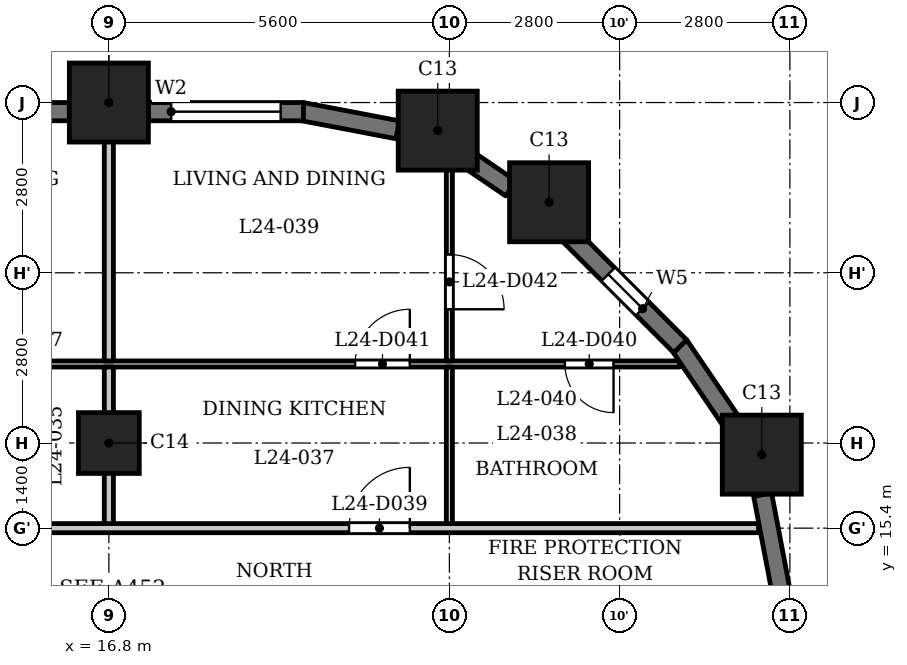
"""IFC4 building model, lengths in metres.
Left out: names, types, materials, properties, quantities, classifications, styles, units other than length and angle.
Written with IfcOpenShell. Run it as: python <this file> out.ifc"""

import sys

from ifc_helpers import new_model, si_unit, direction, frame, frame_2d, origin, origin_2d, place, context, subcontext, project, spatial, rectangle, extrude, element, fill, save


model = new_model("IFC4")
c1 = context("Model", 3, precision=1e-05, world=origin(), true_north=direction((0.0, 1.0)))
c2 = subcontext(c1, "Body", "Model", "MODEL_VIEW")
j1 = project(units=[si_unit("LENGTHUNIT", "METRE"), si_unit("PLANEANGLEUNIT", "RADIAN")], contexts=[c1])
p1 = place(None, origin())
s1 = spatial("IfcSite", under=j1, at=p1, CompositionType="ELEMENT")
p2 = place(p1, origin())
s2 = spatial("IfcBuilding", under=s1, at=p2, CompositionType="ELEMENT")
p3 = place(p2, frame((0.0, 0.0, 97.3)))
s3 = spatial("IfcBuildingStorey", under=s2, at=p3, CompositionType="ELEMENT", Elevation=97.3)
for number, where, z_axis, x_axis in (
    (1, (27.538, 16.609, 0.0), (0.0, 0.0, 1.0), (1.0, 0.0, 0.0)),
    (2, (24.04, 20.76, 0.0), (0.0, 0.0, 1.0), (1.0, 0.0, 0.0)),
    (3, (22.209, 21.938, 0.0), (0.0, 0.0, 1.0), (1.0, 0.0, 0.0)),
    (4, (16.8, 22.4, 0.0), (0.0, 0.0, 1.0), (1.0, 0.0, 0.0)),
):
    element("IfcColumn", number, at=place(p3, frame(where, z_axis=z_axis, x_axis=x_axis)), inside=s3, PredefinedType="COLUMN", context=c2, shape_type="SweptSolid", body=[
        extrude(rectangle(XDim=1.3, YDim=1.3, at=origin_2d()), origin(), (0.0, 0.0, 1.0), 3.5),
    ])
p4 = place(p3, frame((16.8, 16.8, 0.0), z_axis=(0.0, 0.0, 1.0), x_axis=(1.0, 0.0, 0.0)))
e5 = element("IfcColumn", 5, at=p4, inside=s3, PredefinedType="COLUMN", context=c2, shape_type="SweptSolid", body=[
    extrude(rectangle(XDim=1.0, YDim=1.0, at=origin_2d()), origin(), (0.0, 0.0, 1.0), 3.5),
])
for number, where, z_axis, x_axis in (
    (6, (27.853, 14.372, 0.0), (0.0, 0.0, 1.0), (-0.187, 0.982, 0.0)),
    (7, (27.082, 17.084, 0.0), (0.0, 0.0, 1.0), (-0.562, 0.827, 0.0)),
):
    element("IfcWall", number, at=place(p3, frame(where, z_axis=z_axis, x_axis=x_axis)), inside=s3, PredefinedType="SOLIDWALL", context=c2, shape_type="SweptSolid", body=[
        extrude(rectangle(XDim=1.606, YDim=0.3, at=frame_2d((0.803, 0.0))), origin(), (0.0, 0.0, 1.0), 2.4),
    ])
p5 = place(p3, frame((26.197, 18.391, 0.0), z_axis=(0.0, 0.0, 1.0), x_axis=(-0.707058908279, 0.707154650853, 0.0)))
e8 = element("IfcWall", 8, at=p5, inside=s3, PredefinedType="SOLIDWALL", context=c2, shape_type="SweptSolid", body=[
    extrude(rectangle(XDim=2.55, YDim=0.3, at=frame_2d((1.275, 0.0))), origin(), (0.0, 0.0, 1.0), 2.4),
])
p6 = place(p5, frame((0.875, 0.0, 0.6)))
e9 = element("IfcOpeningElement", 9, at=p6, cuts=e8, PredefinedType="OPENING", context=c2, shape_type="SweptSolid", body=[
    extrude(rectangle(XDim=0.8, YDim=1.55, at=frame_2d((0.4, 0.775))), frame((0.0, 0.16, 0.0), z_axis=(0.0, -1.0, 0.0), x_axis=(1.0, 0.0, 0.0)), (0.0, 0.0, 1.0), 0.32),
])
p7 = place(p3, frame((23.41, 20.989, 0.0), z_axis=(0.0, 0.0, 1.0), x_axis=(-0.827050703543, 0.562127328787, 0.0)))
e10 = element("IfcWall", 10, at=p7, inside=s3, PredefinedType="SOLIDWALL", context=c2, shape_type="SweptSolid", body=[
    extrude(rectangle(XDim=0.877, YDim=0.3, at=frame_2d((0.438, 0.0))), origin(), (0.0, 0.0, 1.0), 3.2),
])
p8 = place(p3, frame((21.55, 21.952, 0.0), z_axis=(0.0, 0.0, 1.0), x_axis=(-0.982278644094, 0.187426426519, 0.0)))
e11 = element("IfcWall", 11, at=p8, inside=s3, PredefinedType="SOLIDWALL", context=c2, shape_type="SweptSolid", body=[
    extrude(rectangle(XDim=1.606, YDim=0.3, at=frame_2d((0.803, 0.0))), origin(), (0.0, 0.0, 1.0), 2.4),
])
p9 = place(p3, frame((20.0, 22.25, 0.0), z_axis=(0.0, 0.0, 1.0), x_axis=(-1.0, 0.0, 0.0)))
e12 = element("IfcWall", 12, at=p9, inside=s3, PredefinedType="SOLIDWALL", context=c2, shape_type="SweptSolid", body=[
    extrude(rectangle(XDim=2.55, YDim=0.3, at=frame_2d((1.275, 0.0))), origin(), (0.0, 0.0, 1.0), 2.4),
])
p10 = place(p9, frame((0.375, 0.0, 0.9)))
e13 = element("IfcOpeningElement", 13, at=p10, cuts=e12, PredefinedType="OPENING", context=c2, shape_type="SweptSolid", body=[
    extrude(rectangle(XDim=1.8, YDim=1.25, at=frame_2d((0.9, 0.625))), frame((0.0, 0.16, 0.0), z_axis=(0.0, -1.0, 0.0), x_axis=(1.0, 0.0, 0.0)), (0.0, 0.0, 1.0), 0.32),
])
p11 = place(p3, frame((16.15, 22.25, 0.0), z_axis=(0.0, 0.0, 1.0), x_axis=(-1.0, 0.0, 0.0)))
e14 = element("IfcWall", 14, at=p11, inside=s3, PredefinedType="SOLIDWALL", context=c2, shape_type="SweptSolid", body=[
    extrude(rectangle(XDim=4.3, YDim=0.3, at=frame_2d((2.15, 0.0))), origin(), (0.0, 0.0, 1.0), 2.4),
])
p12 = place(p11, frame((0.35, 0.0, 1.2)))
e15 = element("IfcOpeningElement", 15, at=p12, cuts=e14, PredefinedType="OPENING", context=c2, shape_type="SweptSolid", body=[
    extrude(rectangle(XDim=3.6, YDim=0.95, at=frame_2d((1.8, 0.475))), frame((0.0, 0.16, 0.0), z_axis=(0.0, -1.0, 0.0), x_axis=(1.0, 0.0, 0.0)), (0.0, 0.0, 1.0), 0.32),
])
p13 = place(p3, frame((-27.484, 15.4, 0.0), z_axis=(0.0, 0.0, 1.0), x_axis=(1.0, 0.0, 0.0)))
e16 = element("IfcWall", 16, at=p13, inside=s3, PredefinedType="PARTITIONING", context=c2, shape_type="SweptSolid", body=[
    extrude(rectangle(XDim=54.968, YDim=0.15, at=frame_2d((27.484, 0.0))), origin(), (0.0, 0.0, 1.0), 3.2),
])
p14 = place(p13, frame((9.034, 0.0, 0.0)))
e17 = element("IfcOpeningElement", 17, at=p14, cuts=e16, PredefinedType="OPENING", context=c2, shape_type="SweptSolid", body=[
    extrude(rectangle(XDim=1.0, YDim=2.1, at=frame_2d((0.5, 1.05))), frame((0.0, 0.085, 0.0), z_axis=(0.0, -1.0, 0.0), x_axis=(1.0, 0.0, 0.0)), (0.0, 0.0, 1.0), 0.17),
])
p15 = place(p13, frame((14.634, 0.0, 0.0)))
e18 = element("IfcOpeningElement", 18, at=p15, cuts=e16, PredefinedType="OPENING", context=c2, shape_type="SweptSolid", body=[
    extrude(rectangle(XDim=1.0, YDim=2.1, at=frame_2d((0.5, 1.05))), frame((0.0, 0.085, 0.0), z_axis=(0.0, -1.0, 0.0), x_axis=(1.0, 0.0, 0.0)), (0.0, 0.0, 1.0), 0.17),
])
p16 = place(p13, frame((19.984, 0.0, 0.0)))
e19 = element("IfcOpeningElement", 19, at=p16, cuts=e16, PredefinedType="OPENING", context=c2, shape_type="SweptSolid", body=[
    extrude(rectangle(XDim=1.0, YDim=2.1, at=frame_2d((0.5, 1.05))), frame((0.0, 0.085, 0.0), z_axis=(0.0, -1.0, 0.0), x_axis=(1.0, 0.0, 0.0)), (0.0, 0.0, 1.0), 0.17),
])
p17 = place(p13, frame((23.234, 0.0, 0.0)))
e20 = element("IfcOpeningElement", 20, at=p17, cuts=e16, PredefinedType="OPENING", context=c2, shape_type="SweptSolid", body=[
    extrude(rectangle(XDim=1.0, YDim=2.1, at=frame_2d((0.5, 1.05))), frame((0.0, 0.085, 0.0), z_axis=(0.0, -1.0, 0.0), x_axis=(1.0, 0.0, 0.0)), (0.0, 0.0, 1.0), 0.17),
])
p18 = place(p13, frame((28.184, 0.0, 0.0)))
e21 = element("IfcOpeningElement", 21, at=p18, cuts=e16, PredefinedType="OPENING", context=c2, shape_type="SweptSolid", body=[
    extrude(rectangle(XDim=1.0, YDim=2.1, at=frame_2d((0.5, 1.05))), frame((0.0, 0.085, 0.0), z_axis=(0.0, -1.0, 0.0), x_axis=(1.0, 0.0, 0.0)), (0.0, 0.0, 1.0), 0.17),
])
p19 = place(p13, frame((39.284, 0.0, 0.0)))
e22 = element("IfcOpeningElement", 22, at=p19, cuts=e16, PredefinedType="OPENING", context=c2, shape_type="SweptSolid", body=[
    extrude(rectangle(XDim=1.0, YDim=2.1, at=frame_2d((0.5, 1.05))), frame((0.0, 0.085, 0.0), z_axis=(0.0, -1.0, 0.0), x_axis=(1.0, 0.0, 0.0)), (0.0, 0.0, 1.0), 0.17),
])
p20 = place(p13, frame((48.234, 0.0, 0.0)))
e23 = element("IfcOpeningElement", 23, at=p20, cuts=e16, PredefinedType="OPENING", context=c2, shape_type="SweptSolid", body=[
    extrude(rectangle(XDim=1.0, YDim=2.1, at=frame_2d((0.5, 1.05))), frame((0.0, 0.085, 0.0), z_axis=(0.0, -1.0, 0.0), x_axis=(1.0, 0.0, 0.0)), (0.0, 0.0, 1.0), 0.17),
])
p21 = place(p3, frame((-26.44, 18.1, 0.0), z_axis=(0.0, 0.0, 1.0), x_axis=(1.0, 0.0, 0.0)))
e24 = element("IfcWall", 24, at=p21, inside=s3, PredefinedType="PARTITIONING", context=c2, shape_type="SweptSolid", body=[
    extrude(rectangle(XDim=52.63, YDim=0.1, at=frame_2d((26.315, 0.0))), origin(), (0.0, 0.0, 1.0), 3.2),
])
p22 = place(p21, frame((2.626, 0.0, 0.0)))
e25 = element("IfcOpeningElement", 25, at=p22, cuts=e24, PredefinedType="OPENING", context=c2, shape_type="SweptSolid", body=[
    extrude(rectangle(XDim=0.8, YDim=2.1, at=frame_2d((0.4, 1.05))), frame((0.0, 0.06, 0.0), z_axis=(0.0, -1.0, 0.0), x_axis=(1.0, 0.0, 0.0)), (0.0, 0.0, 1.0), 0.12),
])
p23 = place(p21, frame((8.09, 0.0, 0.0)))
e26 = element("IfcOpeningElement", 26, at=p23, cuts=e24, PredefinedType="OPENING", context=c2, shape_type="SweptSolid", body=[
    extrude(rectangle(XDim=0.9, YDim=2.1, at=frame_2d((0.45, 1.05))), frame((0.0, 0.06, 0.0), z_axis=(0.0, -1.0, 0.0), x_axis=(1.0, 0.0, 0.0)), (0.0, 0.0, 1.0), 0.12),
])
p24 = place(p21, frame((10.29, 0.0, 0.0)))
e27 = element("IfcOpeningElement", 27, at=p24, cuts=e24, PredefinedType="OPENING", context=c2, shape_type="SweptSolid", body=[
    extrude(rectangle(XDim=0.8, YDim=2.1, at=frame_2d((0.4, 1.05))), frame((0.0, 0.06, 0.0), z_axis=(0.0, -1.0, 0.0), x_axis=(1.0, 0.0, 0.0)), (0.0, 0.0, 1.0), 0.12),
])
p25 = place(p21, frame((13.69, 0.0, 0.0)))
e28 = element("IfcOpeningElement", 28, at=p25, cuts=e24, PredefinedType="OPENING", context=c2, shape_type="SweptSolid", body=[
    extrude(rectangle(XDim=0.9, YDim=2.1, at=frame_2d((0.45, 1.05))), frame((0.0, 0.06, 0.0), z_axis=(0.0, -1.0, 0.0), x_axis=(1.0, 0.0, 0.0)), (0.0, 0.0, 1.0), 0.12),
])
p26 = place(p21, frame((15.89, 0.0, 0.0)))
e29 = element("IfcOpeningElement", 29, at=p26, cuts=e24, PredefinedType="OPENING", context=c2, shape_type="SweptSolid", body=[
    extrude(rectangle(XDim=0.8, YDim=2.1, at=frame_2d((0.4, 1.05))), frame((0.0, 0.06, 0.0), z_axis=(0.0, -1.0, 0.0), x_axis=(1.0, 0.0, 0.0)), (0.0, 0.0, 1.0), 0.12),
])
p27 = place(p21, frame((19.04, 0.0, 0.0)))
e30 = element("IfcOpeningElement", 30, at=p27, cuts=e24, PredefinedType="OPENING", context=c2, shape_type="SweptSolid", body=[
    extrude(rectangle(XDim=0.9, YDim=2.1, at=frame_2d((0.45, 1.05))), frame((0.0, 0.06, 0.0), z_axis=(0.0, -1.0, 0.0), x_axis=(1.0, 0.0, 0.0)), (0.0, 0.0, 1.0), 0.12),
])
p28 = place(p21, frame((24.99, 0.0, 0.0)))
e31 = element("IfcOpeningElement", 31, at=p28, cuts=e24, PredefinedType="OPENING", context=c2, shape_type="SweptSolid", body=[
    extrude(rectangle(XDim=0.8, YDim=2.1, at=frame_2d((0.4, 1.05))), frame((0.0, 0.06, 0.0), z_axis=(0.0, -1.0, 0.0), x_axis=(1.0, 0.0, 0.0)), (0.0, 0.0, 1.0), 0.12),
])
p29 = place(p21, frame((22.29, 0.0, 0.0)))
e32 = element("IfcOpeningElement", 32, at=p29, cuts=e24, PredefinedType="OPENING", context=c2, shape_type="SweptSolid", body=[
    extrude(rectangle(XDim=0.9, YDim=2.1, at=frame_2d((0.45, 1.05))), frame((0.0, 0.06, 0.0), z_axis=(0.0, -1.0, 0.0), x_axis=(1.0, 0.0, 0.0)), (0.0, 0.0, 1.0), 0.12),
])
p30 = place(p21, frame((32.69, 0.0, 0.0)))
e33 = element("IfcOpeningElement", 33, at=p30, cuts=e24, PredefinedType="OPENING", context=c2, shape_type="SweptSolid", body=[
    extrude(rectangle(XDim=0.8, YDim=2.1, at=frame_2d((0.4, 1.05))), frame((0.0, 0.06, 0.0), z_axis=(0.0, -1.0, 0.0), x_axis=(1.0, 0.0, 0.0)), (0.0, 0.0, 1.0), 0.12),
])
p31 = place(p21, frame((26.99, 0.0, 0.0)))
e34 = element("IfcOpeningElement", 34, at=p31, cuts=e24, PredefinedType="OPENING", context=c2, shape_type="SweptSolid", body=[
    extrude(rectangle(XDim=0.9, YDim=2.1, at=frame_2d((0.45, 1.05))), frame((0.0, 0.06, 0.0), z_axis=(0.0, -1.0, 0.0), x_axis=(1.0, 0.0, 0.0)), (0.0, 0.0, 1.0), 0.12),
])
p32 = place(p21, frame((41.29, 0.0, 0.0)))
e35 = element("IfcOpeningElement", 35, at=p32, cuts=e24, PredefinedType="OPENING", context=c2, shape_type="SweptSolid", body=[
    extrude(rectangle(XDim=0.8, YDim=2.1, at=frame_2d((0.4, 1.05))), frame((0.0, 0.06, 0.0), z_axis=(0.0, -1.0, 0.0), x_axis=(1.0, 0.0, 0.0)), (0.0, 0.0, 1.0), 0.12),
])
p33 = place(p21, frame((38.34, 0.0, 0.0)))
e36 = element("IfcOpeningElement", 36, at=p33, cuts=e24, PredefinedType="OPENING", context=c2, shape_type="SweptSolid", body=[
    extrude(rectangle(XDim=0.9, YDim=2.1, at=frame_2d((0.45, 1.05))), frame((0.0, 0.06, 0.0), z_axis=(0.0, -1.0, 0.0), x_axis=(1.0, 0.0, 0.0)), (0.0, 0.0, 1.0), 0.12),
])
p34 = place(p21, frame((50.74, 0.0, 0.0)))
e37 = element("IfcOpeningElement", 37, at=p34, cuts=e24, PredefinedType="OPENING", context=c2, shape_type="SweptSolid", body=[
    extrude(rectangle(XDim=0.8, YDim=2.1, at=frame_2d((0.4, 1.05))), frame((0.0, 0.06, 0.0), z_axis=(0.0, -1.0, 0.0), x_axis=(1.0, 0.0, 0.0)), (0.0, 0.0, 1.0), 0.12),
])
p35 = place(p21, frame((47.29, 0.0, 0.0)))
e38 = element("IfcOpeningElement", 38, at=p35, cuts=e24, PredefinedType="OPENING", context=c2, shape_type="SweptSolid", body=[
    extrude(rectangle(XDim=0.9, YDim=2.1, at=frame_2d((0.45, 1.05))), frame((0.0, 0.06, 0.0), z_axis=(0.0, -1.0, 0.0), x_axis=(1.0, 0.0, 0.0)), (0.0, 0.0, 1.0), 0.12),
])
p36 = place(p3, frame((16.8, 15.475, 0.0), z_axis=(0.0, 0.0, 1.0), x_axis=(0.0, 1.0, 0.0)))
e39 = element("IfcWall", 39, at=p36, inside=s3, PredefinedType="PARTITIONING", context=c2, shape_type="SweptSolid", body=[
    extrude(rectangle(XDim=2.575, YDim=0.15, at=frame_2d((1.288, 0.0))), origin(), (0.0, 0.0, 1.0), 3.2),
])
p37 = place(p3, frame((16.8, 18.15, 0.0), z_axis=(0.0, 0.0, 1.0), x_axis=(0.0, 1.0, 0.0)))
e40 = element("IfcWall", 40, at=p37, inside=s3, PredefinedType="PARTITIONING", context=c2, shape_type="SweptSolid", body=[
    extrude(rectangle(XDim=4.88, YDim=0.15, at=frame_2d((2.44, 0.0))), origin(), (0.0, 0.0, 1.0), 3.2),
])
p38 = place(p3, frame((22.4, 15.475, 0.0), z_axis=(0.0, 0.0, 1.0), x_axis=(0.0, 1.0, 0.0)))
e41 = element("IfcWall", 41, at=p38, inside=s3, PredefinedType="PARTITIONING", context=c2, shape_type="SweptSolid", body=[
    extrude(rectangle(XDim=2.575, YDim=0.1, at=frame_2d((1.288, 0.0))), origin(), (0.0, 0.0, 1.0), 3.2),
])
p39 = place(p3, frame((22.4, 18.15, 0.0), z_axis=(0.0, 0.0, 1.0), x_axis=(0.0, 1.0, 0.0)))
e42 = element("IfcWall", 42, at=p39, inside=s3, PredefinedType="PARTITIONING", context=c2, shape_type="SweptSolid", body=[
    extrude(rectangle(XDim=3.57, YDim=0.1, at=frame_2d((1.785, 0.0))), origin(), (0.0, 0.0, 1.0), 3.2),
])
p40 = place(p39, frame((0.85, 0.0, 0.0)))
e43 = element("IfcOpeningElement", 43, at=p40, cuts=e42, PredefinedType="OPENING", context=c2, shape_type="SweptSolid", body=[
    extrude(rectangle(XDim=0.9, YDim=2.1, at=frame_2d((0.45, 1.05))), frame((0.0, 0.06, 0.0), z_axis=(0.0, -1.0, 0.0), x_axis=(1.0, 0.0, 0.0)), (0.0, 0.0, 1.0), 0.12),
])
p41 = place(p20, origin())
e44 = element("IfcDoor", 44, at=p41, inside=s3, OperationType="SINGLE_SWING_LEFT", PredefinedType="DOOR", context=c2, shape_type="SweptSolid", body=[
    extrude(rectangle(XDim=1.0, YDim=2.1, at=frame_2d((0.5, 1.05))), frame((0.0, 0.025, 0.0), z_axis=(0.0, -1.0, 0.0), x_axis=(1.0, 0.0, 0.0)), (0.0, 0.0, 1.0), 0.05),
])
fill(e23, e44)
p42 = place(p34, origin())
e45 = element("IfcDoor", 45, at=p42, inside=s3, OperationType="SINGLE_SWING_RIGHT", PredefinedType="DOOR", context=c2, shape_type="SweptSolid", body=[
    extrude(rectangle(XDim=0.8, YDim=2.1, at=frame_2d((0.4, 1.05))), frame((0.0, 0.025, 0.0), z_axis=(0.0, -1.0, 0.0), x_axis=(1.0, 0.0, 0.0)), (0.0, 0.0, 1.0), 0.05),
])
fill(e37, e45)
p43 = place(p35, origin())
e46 = element("IfcDoor", 46, at=p43, inside=s3, OperationType="SINGLE_SWING_LEFT", PredefinedType="DOOR", context=c2, shape_type="SweptSolid", body=[
    extrude(rectangle(XDim=0.9, YDim=2.1, at=frame_2d((0.45, 1.05))), frame((0.0, 0.025, 0.0), z_axis=(0.0, -1.0, 0.0), x_axis=(1.0, 0.0, 0.0)), (0.0, 0.0, 1.0), 0.05),
])
fill(e38, e46)
p44 = place(p40, origin())
e47 = element("IfcDoor", 47, at=p44, inside=s3, OperationType="SINGLE_SWING_LEFT", PredefinedType="DOOR", context=c2, shape_type="SweptSolid", body=[
    extrude(rectangle(XDim=0.9, YDim=2.1, at=frame_2d((0.45, 1.05))), frame((0.0, 0.025, 0.0), z_axis=(0.0, -1.0, 0.0), x_axis=(1.0, 0.0, 0.0)), (0.0, 0.0, 1.0), 0.05),
])
fill(e43, e47)
p45 = place(p6, origin())
e48 = element("IfcWindow", 48, at=p45, inside=s3, PartitioningType="SINGLE_PANEL", PredefinedType="WINDOW", context=c2, shape_type="SweptSolid", body=[
    extrude(rectangle(XDim=0.8, YDim=1.55, at=frame_2d((0.4, 0.775))), frame((0.0, 0.03, 0.0), z_axis=(0.0, -1.0, 0.0), x_axis=(1.0, 0.0, 0.0)), (0.0, 0.0, 1.0), 0.06),
])
fill(e9, e48)
p46 = place(p10, origin())
e49 = element("IfcWindow", 49, at=p46, inside=s3, PartitioningType="SINGLE_PANEL", PredefinedType="WINDOW", context=c2, shape_type="SweptSolid", body=[
    extrude(rectangle(XDim=1.8, YDim=1.25, at=frame_2d((0.9, 0.625))), frame((0.0, 0.03, 0.0), z_axis=(0.0, -1.0, 0.0), x_axis=(1.0, 0.0, 0.0)), (0.0, 0.0, 1.0), 0.06),
])
fill(e13, e49)
save(model, sys.argv[1])
